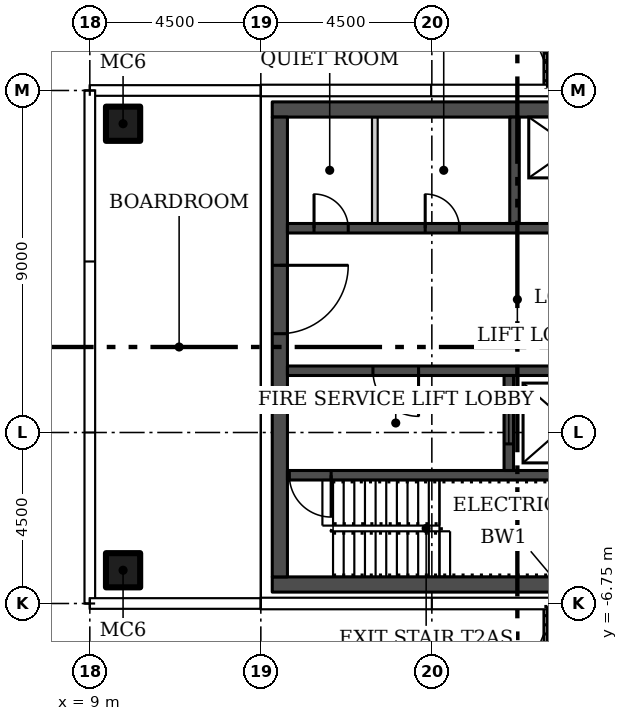
"""IFC4 building model, lengths in metres.
Left out: names, types, materials, properties, quantities, classifications, styles, units other than length and angle.
Written with IfcOpenShell. Run it as: python <this file> out.ifc"""

import sys

from ifc_helpers import new_model, si_unit, direction, frame, frame_2d, origin, origin_2d, place, context, subcontext, project, spatial, rectangle, hollow_rectangle, extrude, element, fill, save


model = new_model("IFC4")
c1 = context("Model", 3, precision=1e-05, world=origin(), true_north=direction((0.0, 1.0)))
c2 = subcontext(c1, "Body", "Model", "MODEL_VIEW")
j1 = project(units=[si_unit("LENGTHUNIT", "METRE"), si_unit("PLANEANGLEUNIT", "RADIAN")], contexts=[c1])
p1 = place(None, origin())
s1 = spatial("IfcSite", under=j1, at=p1, CompositionType="ELEMENT")
p2 = place(p1, origin())
s2 = spatial("IfcBuilding", under=s1, at=p2, CompositionType="ELEMENT")
p3 = place(p2, frame((0.0, 0.0, 257.7)))
s3 = spatial("IfcBuildingStorey", under=s2, at=p3, CompositionType="ELEMENT", Elevation=257.7)
for number, where in (
    (1, (9.875, -5.875, 0.0)),
    (2, (9.875, 5.875, 0.0)),
):
    element("IfcColumn", number, at=place(p3, frame(where)), inside=s3, PredefinedType="COLUMN", context=c2, shape_type="SweptSolid", body=[
        extrude(hollow_rectangle(XDim=0.9, YDim=0.9, WallThickness=0.036, at=origin_2d()), origin(), (0.0, 0.0, 1.0), 3.55),
    ])
for number, where in (
    (3, (13.8, -6.25, 0.0)),
    (4, (13.8, 6.25, 0.0)),
):
    element("IfcWall", number, at=place(p3, frame(where)), inside=s3, PredefinedType="SHEAR", context=c2, shape_type="SweptSolid", body=[
        extrude(rectangle(XDim=12.9, YDim=0.4, at=frame_2d((6.45, 0.0))), origin(), (0.0, 0.0, 1.0), 3.55),
    ])
p4 = place(p3, frame((14.0, 6.05, 0.0), z_axis=(0.0, 0.0, 1.0), x_axis=(0.0, -1.0, 0.0)))
e5 = element("IfcWall", 5, at=p4, inside=s3, PredefinedType="SHEAR", context=c2, shape_type="SweptSolid", body=[
    extrude(rectangle(XDim=12.1, YDim=0.4, at=frame_2d((6.05, 0.0))), origin(), (0.0, 0.0, 1.0), 3.55),
])
p5 = place(p4, frame((3.9, 0.0, 0.0)))
e6 = element("IfcOpeningElement", 6, at=p5, cuts=e5, PredefinedType="OPENING", context=c2, shape_type="SweptSolid", body=[
    extrude(rectangle(XDim=1.8, YDim=2.4, at=frame_2d((0.9, 1.2))), frame((0.0, 0.21, 0.0), z_axis=(0.0, -1.0, 0.0), x_axis=(1.0, 0.0, 0.0)), (0.0, 0.0, 1.0), 0.42),
])
p6 = place(p3, frame((26.3, -3.375, 0.0), z_axis=(0.0, 0.0, 1.0), x_axis=(-1.0, 0.0, 0.0)))
e7 = element("IfcWall", 7, at=p6, inside=s3, PredefinedType="SHEAR", context=c2, shape_type="SweptSolid", body=[
    extrude(rectangle(XDim=12.1, YDim=0.25, at=frame_2d((6.05, 0.0))), origin(), (0.0, 0.0, 1.0), 3.55),
])
p7 = place(p6, frame((10.95, 0.0, 0.0)))
e8 = element("IfcOpeningElement", 8, at=p7, cuts=e7, PredefinedType="OPENING", context=c2, shape_type="SweptSolid", body=[
    extrude(rectangle(XDim=1.1, YDim=2.1, at=frame_2d((0.55, 1.05))), frame((0.0, 0.135, 0.0), z_axis=(0.0, -1.0, 0.0), x_axis=(1.0, 0.0, 0.0)), (0.0, 0.0, 1.0), 0.27),
])
p8 = place(p3, frame((26.3, -0.625, 0.0), z_axis=(0.0, 0.0, 1.0), x_axis=(-1.0, 0.0, 0.0)))
e9 = element("IfcWall", 9, at=p8, inside=s3, PredefinedType="SHEAR", context=c2, shape_type="SweptSolid", body=[
    extrude(rectangle(XDim=12.1, YDim=0.25, at=frame_2d((6.05, 0.0))), origin(), (0.0, 0.0, 1.0), 3.55),
])
p9 = place(p8, frame((8.65, 0.0, 0.0)))
e10 = element("IfcOpeningElement", 10, at=p9, cuts=e9, PredefinedType="OPENING", context=c2, shape_type="SweptSolid", body=[
    extrude(rectangle(XDim=1.2, YDim=2.1, at=frame_2d((0.6, 1.05))), frame((0.0, 0.135, 0.0), z_axis=(0.0, -1.0, 0.0), x_axis=(1.0, 0.0, 0.0)), (0.0, 0.0, 1.0), 0.27),
])
p10 = place(p8, frame((1.175, 0.0, 0.0)))
e11 = element("IfcOpeningElement", 11, at=p10, cuts=e9, PredefinedType="OPENING", context=c2, shape_type="SweptSolid", body=[
    extrude(rectangle(XDim=0.9, YDim=2.1, at=frame_2d((0.45, 1.05))), frame((0.0, 0.135, 0.0), z_axis=(0.0, -1.0, 0.0), x_axis=(1.0, 0.0, 0.0)), (0.0, 0.0, 1.0), 0.27),
])
p11 = place(p3, frame((20.025, -3.25, 0.0), z_axis=(0.0, 0.0, 1.0), x_axis=(0.0, 1.0, 0.0)))
e12 = element("IfcWall", 12, at=p11, inside=s3, PredefinedType="SHEAR", context=c2, shape_type="SweptSolid", body=[
    extrude(rectangle(XDim=2.5, YDim=0.25, at=frame_2d((1.25, 0.0))), origin(), (0.0, 0.0, 1.0), 3.55),
])
p12 = place(p11, frame((0.7, 0.0, 0.0)))
e13 = element("IfcOpeningElement", 13, at=p12, cuts=e12, PredefinedType="OPENING", context=c2, shape_type="SweptSolid", body=[
    extrude(rectangle(XDim=1.1, YDim=2.1, at=frame_2d((0.55, 1.05))), frame((0.0, 0.135, 0.0), z_axis=(0.0, -1.0, 0.0), x_axis=(1.0, 0.0, 0.0)), (0.0, 0.0, 1.0), 0.27),
])
p13 = place(p3, frame((14.2, 3.125, 0.0)))
e14 = element("IfcWall", 14, at=p13, inside=s3, PredefinedType="SHEAR", context=c2, shape_type="SweptSolid", body=[
    extrude(rectangle(XDim=12.1, YDim=0.25, at=frame_2d((6.05, 0.0))), origin(), (0.0, 0.0, 1.0), 3.55),
])
p14 = place(p13, frame((6.95, 0.0, 0.0)))
e15 = element("IfcOpeningElement", 15, at=p14, cuts=e14, PredefinedType="OPENING", context=c2, shape_type="SweptSolid", body=[
    extrude(rectangle(XDim=1.1, YDim=2.1, at=frame_2d((0.55, 1.05))), frame((0.0, 0.135, 0.0), z_axis=(0.0, -1.0, 0.0), x_axis=(1.0, 0.0, 0.0)), (0.0, 0.0, 1.0), 0.27),
])
p15 = place(p13, frame((10.075, 0.0, 0.0)))
e16 = element("IfcOpeningElement", 16, at=p15, cuts=e14, PredefinedType="OPENING", context=c2, shape_type="SweptSolid", body=[
    extrude(rectangle(XDim=1.1, YDim=2.1, at=frame_2d((0.55, 1.05))), frame((0.0, 0.135, 0.0), z_axis=(0.0, -1.0, 0.0), x_axis=(1.0, 0.0, 0.0)), (0.0, 0.0, 1.0), 0.27),
])
p16 = place(p13, frame((0.7, 0.0, 0.0)))
e17 = element("IfcOpeningElement", 17, at=p16, cuts=e14, PredefinedType="OPENING", context=c2, shape_type="SweptSolid", body=[
    extrude(rectangle(XDim=0.9, YDim=2.1, at=frame_2d((0.45, 1.05))), frame((0.0, 0.135, 0.0), z_axis=(0.0, -1.0, 0.0), x_axis=(1.0, 0.0, 0.0)), (0.0, 0.0, 1.0), 0.27),
])
p17 = place(p13, frame((3.625, 0.0, 0.0)))
e18 = element("IfcOpeningElement", 18, at=p17, cuts=e14, PredefinedType="OPENING", context=c2, shape_type="SweptSolid", body=[
    extrude(rectangle(XDim=0.9, YDim=2.1, at=frame_2d((0.45, 1.05))), frame((0.0, 0.135, 0.0), z_axis=(0.0, -1.0, 0.0), x_axis=(1.0, 0.0, 0.0)), (0.0, 0.0, 1.0), 0.27),
])
p18 = place(p3, frame((20.175, 3.25, 0.0), z_axis=(0.0, 0.0, 1.0), x_axis=(0.0, 1.0, 0.0)))
e19 = element("IfcWall", 19, at=p18, inside=s3, PredefinedType="SHEAR", context=c2, shape_type="SweptSolid", body=[
    extrude(rectangle(XDim=2.8, YDim=0.25, at=frame_2d((1.4, 0.0))), origin(), (0.0, 0.0, 1.0), 3.55),
])
p19 = place(p3, frame((16.5, 3.25, 0.0), z_axis=(0.0, 0.0, 1.0), x_axis=(0.0, 1.0, 0.0)))
e20 = element("IfcWall", 20, at=p19, inside=s3, PredefinedType="PARTITIONING", context=c2, shape_type="SweptSolid", body=[
    extrude(rectangle(XDim=2.8, YDim=0.15, at=frame_2d((1.4, 0.0))), origin(), (0.0, 0.0, 1.0), 3.55),
])
p20 = place(p5, origin())
e21 = element("IfcDoor", 21, at=p20, inside=s3, OperationType="DOUBLE_DOOR_SINGLE_SWING", PredefinedType="DOOR", context=c2, shape_type="SweptSolid", body=[
    extrude(rectangle(XDim=1.8, YDim=2.4, at=frame_2d((0.9, 1.2))), frame((0.0, 0.025, 0.0), z_axis=(0.0, -1.0, 0.0), x_axis=(1.0, 0.0, 0.0)), (0.0, 0.0, 1.0), 0.05),
])
fill(e6, e21)
p21 = place(p7, origin())
e22 = element("IfcDoor", 22, at=p21, inside=s3, OperationType="SINGLE_SWING_RIGHT", PredefinedType="DOOR", context=c2, shape_type="SweptSolid", body=[
    extrude(rectangle(XDim=1.1, YDim=2.1, at=frame_2d((0.55, 1.05))), frame((0.0, 0.025, 0.0), z_axis=(0.0, -1.0, 0.0), x_axis=(1.0, 0.0, 0.0)), (0.0, 0.0, 1.0), 0.05),
])
fill(e8, e22)
p22 = place(p9, origin())
e23 = element("IfcDoor", 23, at=p22, inside=s3, OperationType="SINGLE_SWING_RIGHT", PredefinedType="DOOR", context=c2, shape_type="SweptSolid", body=[
    extrude(rectangle(XDim=1.2, YDim=2.1, at=frame_2d((0.6, 1.05))), frame((0.0, 0.025, 0.0), z_axis=(0.0, -1.0, 0.0), x_axis=(1.0, 0.0, 0.0)), (0.0, 0.0, 1.0), 0.05),
])
fill(e10, e23)
p23 = place(p12, origin())
e24 = element("IfcDoor", 24, at=p23, inside=s3, OperationType="SLIDING_TO_LEFT", PredefinedType="DOOR", context=c2, shape_type="SweptSolid", body=[
    extrude(rectangle(XDim=1.1, YDim=2.1, at=frame_2d((0.55, 1.05))), frame((0.0, 0.025, 0.0), z_axis=(0.0, -1.0, 0.0), x_axis=(1.0, 0.0, 0.0)), (0.0, 0.0, 1.0), 0.05),
])
fill(e13, e24)
p24 = place(p16, origin())
e25 = element("IfcDoor", 25, at=p24, inside=s3, OperationType="SINGLE_SWING_LEFT", PredefinedType="DOOR", context=c2, shape_type="SweptSolid", body=[
    extrude(rectangle(XDim=0.9, YDim=2.1, at=frame_2d((0.45, 1.05))), frame((0.0, 0.025, 0.0), z_axis=(0.0, -1.0, 0.0), x_axis=(1.0, 0.0, 0.0)), (0.0, 0.0, 1.0), 0.05),
])
fill(e17, e25)
p25 = place(p17, origin())
e26 = element("IfcDoor", 26, at=p25, inside=s3, OperationType="SINGLE_SWING_LEFT", PredefinedType="DOOR", context=c2, shape_type="SweptSolid", body=[
    extrude(rectangle(XDim=0.9, YDim=2.1, at=frame_2d((0.45, 1.05))), frame((0.0, 0.025, 0.0), z_axis=(0.0, -1.0, 0.0), x_axis=(1.0, 0.0, 0.0)), (0.0, 0.0, 1.0), 0.05),
])
fill(e18, e26)
save(model, sys.argv[1])
